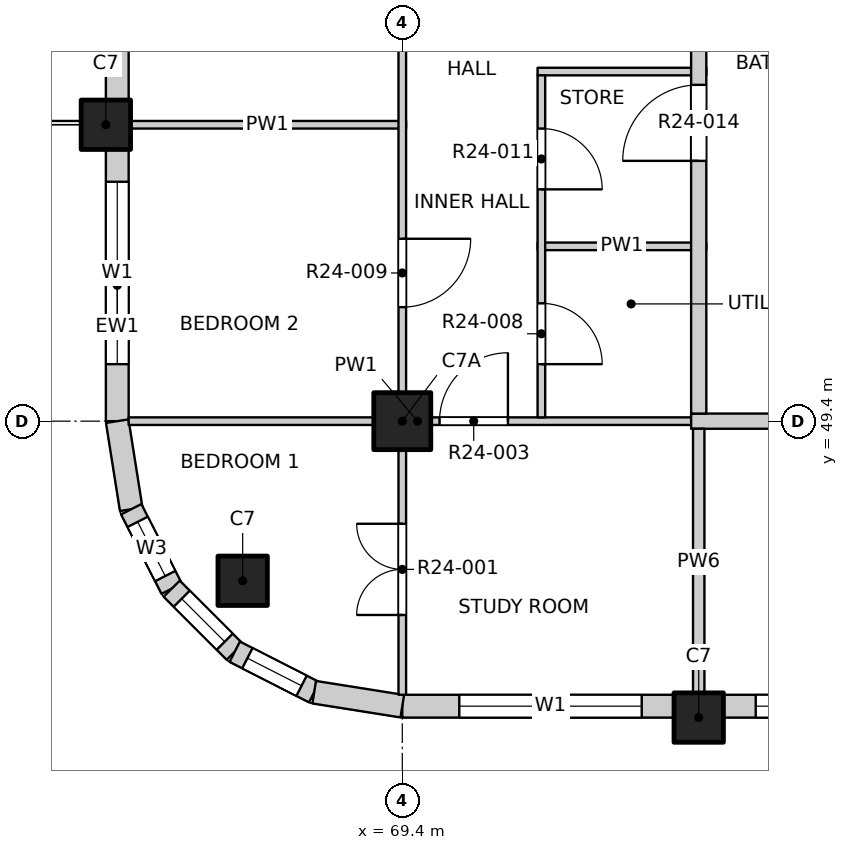
"""IFC4 building model, lengths in metres.
Left out: names, types, materials, properties, quantities, classifications, styles, units other than length and angle.
Written with IfcOpenShell. Run it as: python <this file> out.ifc"""

import sys

from ifc_helpers import new_model, si_unit, direction, frame, frame_2d, origin, origin_2d, place, context, subcontext, project, spatial, rectangle, extrude, element, fill, save


model = new_model("IFC4")
c1 = context("Model", 3, precision=1e-05, world=origin(), true_north=direction((0.0, 1.0)))
c2 = subcontext(c1, "Body", "Model", "MODEL_VIEW")
j1 = project(units=[si_unit("LENGTHUNIT", "METRE"), si_unit("PLANEANGLEUNIT", "RADIAN")], contexts=[c1])
p1 = place(None, origin())
s1 = spatial("IfcSite", under=j1, at=p1, CompositionType="ELEMENT")
p2 = place(p1, origin())
s2 = spatial("IfcBuilding", under=s1, at=p2, CompositionType="ELEMENT")
p3 = place(p2, frame((0.0, 0.0, 246.0)))
s3 = spatial("IfcBuildingStorey", under=s2, at=p3, CompositionType="ELEMENT", Elevation=246.0)
for number, where, z_axis, x_axis in (
    (1, (67.3, 47.3, -0.3), (0.0, 0.0, 1.0), (1.0, 0.0, 0.0)),
    (2, (65.5, 53.3, -0.3), (0.0, 0.0, 1.0), (1.0, 0.0, 0.0)),
    (3, (73.3, 45.5, -0.3), (0.0, 0.0, 1.0), (1.0, 0.0, 0.0)),
):
    element("IfcColumn", number, at=place(p3, frame(where, z_axis=z_axis, x_axis=x_axis)), inside=s3, PredefinedType="COLUMN", context=c2, shape_type="SweptSolid", body=[
        extrude(rectangle(XDim=0.65, YDim=0.65, at=origin_2d()), origin(), (0.0, 0.0, 1.0), 3.45),
    ])
p4 = place(p3, frame((69.4, 49.4, -0.3), z_axis=(0.0, 0.0, 1.0), x_axis=(1.0, 0.0, 0.0)))
e4 = element("IfcColumn", 4, at=p4, inside=s3, PredefinedType="COLUMN", context=c2, shape_type="SweptSolid", body=[
    extrude(rectangle(XDim=0.75, YDim=0.75, at=origin_2d()), origin(), (0.0, 0.0, 1.0), 3.45),
])
p5 = place(p3, frame((69.4, 45.65, 0.0), z_axis=(0.0, 0.0, 1.0), x_axis=(1.0, 0.0, 0.0)))
e5 = element("IfcWall", 5, at=p5, inside=s3, PredefinedType="SOLIDWALL", context=c2, shape_type="SweptSolid", body=[
    extrude(rectangle(XDim=3.575, YDim=0.3, at=frame_2d((1.788, 0.0))), origin(), (0.0, 0.0, 1.0), 2.7),
])
p6 = place(p5, frame((0.75, 0.0, 0.9)))
e6 = element("IfcOpeningElement", 6, at=p6, cuts=e5, PredefinedType="OPENING", context=c2, shape_type="SweptSolid", body=[
    extrude(rectangle(XDim=2.4, YDim=1.8, at=frame_2d((1.2, 0.9))), frame((0.0, 0.16, 0.0), z_axis=(0.0, -1.0, 0.0), x_axis=(1.0, 0.0, 0.0)), (0.0, 0.0, 1.0), 0.32),
])
p7 = place(p3, frame((73.625, 45.65, 0.0), z_axis=(0.0, 0.0, 1.0), x_axis=(1.0, 0.0, 0.0)))
e7 = element("IfcWall", 7, at=p7, inside=s3, PredefinedType="SOLIDWALL", context=c2, shape_type="SweptSolid", body=[
    extrude(rectangle(XDim=7.15, YDim=0.3, at=frame_2d((3.575, 0.0))), origin(), (0.0, 0.0, 1.0), 2.7),
])
p8 = place(p7, frame((0.425, 0.0, 0.9)))
e8 = element("IfcOpeningElement", 8, at=p8, cuts=e7, PredefinedType="OPENING", context=c2, shape_type="SweptSolid", body=[
    extrude(rectangle(XDim=2.4, YDim=1.8, at=frame_2d((1.2, 0.9))), frame((0.0, 0.16, 0.0), z_axis=(0.0, -1.0, 0.0), x_axis=(1.0, 0.0, 0.0)), (0.0, 0.0, 1.0), 0.32),
])
p9 = place(p7, frame((4.325, 0.0, 0.9)))
e9 = element("IfcOpeningElement", 9, at=p9, cuts=e7, PredefinedType="OPENING", context=c2, shape_type="SweptSolid", body=[
    extrude(rectangle(XDim=2.4, YDim=1.8, at=frame_2d((1.2, 0.9))), frame((0.0, 0.16, 0.0), z_axis=(0.0, -1.0, 0.0), x_axis=(1.0, 0.0, 0.0)), (0.0, 0.0, 1.0), 0.32),
])
p10 = place(p3, frame((65.65, 49.4, 0.0), z_axis=(0.0, 0.0, 1.0), x_axis=(0.0, 1.0, 0.0)))
e10 = element("IfcWall", 10, at=p10, inside=s3, PredefinedType="SOLIDWALL", context=c2, shape_type="SweptSolid", body=[
    extrude(rectangle(XDim=3.575, YDim=0.3, at=frame_2d((1.788, 0.0))), origin(), (0.0, 0.0, 1.0), 2.7),
])
p11 = place(p10, frame((0.75, 0.0, 0.9)))
e11 = element("IfcOpeningElement", 11, at=p11, cuts=e10, PredefinedType="OPENING", context=c2, shape_type="SweptSolid", body=[
    extrude(rectangle(XDim=2.4, YDim=1.8, at=frame_2d((1.2, 0.9))), frame((0.0, 0.16, 0.0), z_axis=(0.0, -1.0, 0.0), x_axis=(1.0, 0.0, 0.0)), (0.0, 0.0, 1.0), 0.32),
])
p12 = place(p3, frame((65.65, 53.625, 0.0), z_axis=(0.0, 0.0, 1.0), x_axis=(0.0, 1.0, 0.0)))
e12 = element("IfcWall", 12, at=p12, inside=s3, PredefinedType="SOLIDWALL", context=c2, shape_type="SweptSolid", body=[
    extrude(rectangle(XDim=7.15, YDim=0.3, at=frame_2d((3.575, 0.0))), origin(), (0.0, 0.0, 1.0), 2.7),
])
p13 = place(p12, frame((0.725, 0.0, 0.0)))
e13 = element("IfcOpeningElement", 13, at=p13, cuts=e12, PredefinedType="OPENING", context=c2, shape_type="SweptSolid", body=[
    extrude(rectangle(XDim=1.8, YDim=2.4, at=frame_2d((0.9, 1.2))), frame((0.0, 0.16, 0.0), z_axis=(0.0, -1.0, 0.0), x_axis=(1.0, 0.0, 0.0)), (0.0, 0.0, 1.0), 0.32),
])
p14 = place(p12, frame((4.325, 0.0, 0.9)))
e14 = element("IfcOpeningElement", 14, at=p14, cuts=e12, PredefinedType="OPENING", context=c2, shape_type="SweptSolid", body=[
    extrude(rectangle(XDim=2.4, YDim=1.8, at=frame_2d((1.2, 0.9))), frame((0.0, 0.16, 0.0), z_axis=(0.0, -1.0, 0.0), x_axis=(1.0, 0.0, 0.0)), (0.0, 0.0, 1.0), 0.32),
])
p15 = place(p3, frame((65.65, 49.4, 0.0), z_axis=(0.0, 0.0, 1.0), x_axis=(0.156496880861, -0.987678452879, 0.0)))
e15 = element("IfcWall", 15, at=p15, inside=s3, PredefinedType="SOLIDWALL", context=c2, shape_type="SweptSolid", body=[
    extrude(rectangle(XDim=1.173, YDim=0.3, at=frame_2d((0.586, 0.0))), origin(), (0.0, 0.0, 1.0), 2.7),
])
p16 = place(p3, frame((65.833, 48.241, 0.0), z_axis=(0.0, 0.0, 1.0), x_axis=(0.454025524128, -0.890988677504, 0.0)))
e16 = element("IfcWall", 16, at=p16, inside=s3, PredefinedType="SOLIDWALL", context=c2, shape_type="SweptSolid", body=[
    extrude(rectangle(XDim=1.173, YDim=0.3, at=frame_2d((0.587, 0.0))), origin(), (0.0, 0.0, 1.0), 2.7),
])
p17 = place(p16, frame((0.187, 0.0, 0.9)))
e17 = element("IfcOpeningElement", 17, at=p17, cuts=e16, PredefinedType="OPENING", context=c2, shape_type="SweptSolid", body=[
    extrude(rectangle(XDim=0.8, YDim=1.2, at=frame_2d((0.4, 0.6))), frame((0.0, 0.16, 0.0), z_axis=(0.0, -1.0, 0.0), x_axis=(1.0, 0.0, 0.0)), (0.0, 0.0, 1.0), 0.32),
])
p18 = place(p3, frame((66.366, 47.196, 0.0), z_axis=(0.0, 0.0, 1.0), x_axis=(0.707106781187, -0.707106781187, 0.0)))
e18 = element("IfcWall", 18, at=p18, inside=s3, PredefinedType="SOLIDWALL", context=c2, shape_type="SweptSolid", body=[
    extrude(rectangle(XDim=1.173, YDim=0.3, at=frame_2d((0.586, 0.0))), origin(), (0.0, 0.0, 1.0), 2.7),
])
p19 = place(p18, frame((0.187, 0.0, 0.9)))
e19 = element("IfcOpeningElement", 19, at=p19, cuts=e18, PredefinedType="OPENING", context=c2, shape_type="SweptSolid", body=[
    extrude(rectangle(XDim=0.8, YDim=1.2, at=frame_2d((0.4, 0.6))), frame((0.0, 0.16, 0.0), z_axis=(0.0, -1.0, 0.0), x_axis=(1.0, 0.0, 0.0)), (0.0, 0.0, 1.0), 0.32),
])
p20 = place(p3, frame((67.196, 46.366, 0.0), z_axis=(0.0, 0.0, 1.0), x_axis=(0.890988677504, -0.454025524128, 0.0)))
e20 = element("IfcWall", 20, at=p20, inside=s3, PredefinedType="SOLIDWALL", context=c2, shape_type="SweptSolid", body=[
    extrude(rectangle(XDim=1.173, YDim=0.3, at=frame_2d((0.587, 0.0))), origin(), (0.0, 0.0, 1.0), 2.7),
])
p21 = place(p20, frame((0.187, 0.0, 0.9)))
e21 = element("IfcOpeningElement", 21, at=p21, cuts=e20, PredefinedType="OPENING", context=c2, shape_type="SweptSolid", body=[
    extrude(rectangle(XDim=0.8, YDim=1.2, at=frame_2d((0.4, 0.6))), frame((0.0, 0.16, 0.0), z_axis=(0.0, -1.0, 0.0), x_axis=(1.0, 0.0, 0.0)), (0.0, 0.0, 1.0), 0.32),
])
p22 = place(p3, frame((68.241, 45.833, 0.0), z_axis=(0.0, 0.0, 1.0), x_axis=(0.987678452879, -0.156496880861, 0.0)))
e22 = element("IfcWall", 22, at=p22, inside=s3, PredefinedType="SOLIDWALL", context=c2, shape_type="SweptSolid", body=[
    extrude(rectangle(XDim=1.173, YDim=0.3, at=frame_2d((0.586, 0.0))), origin(), (0.0, 0.0, 1.0), 2.7),
])
p23 = place(p3, frame((65.8, 49.4, 0.0), z_axis=(0.0, 0.0, 1.0), x_axis=(1.0, 0.0, 0.0)))
e23 = element("IfcWall", 23, at=p23, inside=s3, PredefinedType="PARTITIONING", context=c2, shape_type="SweptSolid", body=[
    extrude(rectangle(XDim=7.6, YDim=0.1, at=frame_2d((3.8, 0.0))), origin(), (0.0, 0.0, 1.0), 3.15),
])
p24 = place(p23, frame((4.09, 0.0, 0.0)))
e24 = element("IfcOpeningElement", 24, at=p24, cuts=e23, PredefinedType="OPENING", context=c2, shape_type="SweptSolid", body=[
    extrude(rectangle(XDim=0.9, YDim=2.1, at=frame_2d((0.45, 1.05))), frame((0.0, 0.06, 0.0), z_axis=(0.0, -1.0, 0.0), x_axis=(1.0, 0.0, 0.0)), (0.0, 0.0, 1.0), 0.12),
])
p25 = place(p3, frame((73.2, 49.4, 0.0), z_axis=(0.0, 0.0, 1.0), x_axis=(1.0, 0.0, 0.0)))
e25 = element("IfcWall", 25, at=p25, inside=s3, PredefinedType="PARTITIONING", context=c2, shape_type="SweptSolid", body=[
    extrude(rectangle(XDim=23.6, YDim=0.2, at=frame_2d((11.8, 0.0))), origin(), (0.0, 0.0, 1.0), 3.15),
])
p26 = place(p25, frame((7.3, 0.0, 0.0)))
e26 = element("IfcOpeningElement", 26, at=p26, cuts=e25, PredefinedType="OPENING", context=c2, shape_type="SweptSolid", body=[
    extrude(rectangle(XDim=1.2, YDim=2.1, at=frame_2d((0.6, 1.05))), frame((0.0, 0.11, 0.0), z_axis=(0.0, -1.0, 0.0), x_axis=(1.0, 0.0, 0.0)), (0.0, 0.0, 1.0), 0.22),
])
p27 = place(p25, frame((20.075, 0.0, 0.0)))
e27 = element("IfcOpeningElement", 27, at=p27, cuts=e25, PredefinedType="OPENING", context=c2, shape_type="SweptSolid", body=[
    extrude(rectangle(XDim=1.2, YDim=2.1, at=frame_2d((0.6, 1.05))), frame((0.0, 0.11, 0.0), z_axis=(0.0, -1.0, 0.0), x_axis=(1.0, 0.0, 0.0)), (0.0, 0.0, 1.0), 0.22),
])
p28 = place(p3, frame((71.18, 51.7, 0.0), z_axis=(0.0, 0.0, 1.0), x_axis=(1.0, 0.0, 0.0)))
e28 = element("IfcWall", 28, at=p28, inside=s3, PredefinedType="PARTITIONING", context=c2, shape_type="SweptSolid", body=[
    extrude(rectangle(XDim=2.22, YDim=0.1, at=frame_2d((1.11, 0.0))), origin(), (0.0, 0.0, 1.0), 3.15),
])
p29 = place(p3, frame((65.8, 53.3, 0.0), z_axis=(0.0, 0.0, 1.0), x_axis=(1.0, 0.0, 0.0)))
e29 = element("IfcWall", 29, at=p29, inside=s3, PredefinedType="PARTITIONING", context=c2, shape_type="SweptSolid", body=[
    extrude(rectangle(XDim=3.65, YDim=0.1, at=frame_2d((1.825, 0.0))), origin(), (0.0, 0.0, 1.0), 3.15),
])
p30 = place(p3, frame((71.18, 54.0, 0.0), z_axis=(0.0, 0.0, 1.0), x_axis=(1.0, 0.0, 0.0)))
e30 = element("IfcWall", 30, at=p30, inside=s3, PredefinedType="PARTITIONING", context=c2, shape_type="SweptSolid", body=[
    extrude(rectangle(XDim=2.22, YDim=0.1, at=frame_2d((1.11, 0.0))), origin(), (0.0, 0.0, 1.0), 3.15),
])
p31 = place(p3, frame((69.4, 45.8, 0.0), z_axis=(0.0, 0.0, 1.0), x_axis=(0.0, 1.0, 0.0)))
e31 = element("IfcWall", 31, at=p31, inside=s3, PredefinedType="PARTITIONING", context=c2, shape_type="SweptSolid", body=[
    extrude(rectangle(XDim=38.4, YDim=0.1, at=frame_2d((19.2, 0.0))), origin(), (0.0, 0.0, 1.0), 3.15),
])
p32 = place(p31, frame((1.05, 0.0, 0.0)))
e32 = element("IfcOpeningElement", 32, at=p32, cuts=e31, PredefinedType="OPENING", context=c2, shape_type="SweptSolid", body=[
    extrude(rectangle(XDim=1.2, YDim=2.1, at=frame_2d((0.6, 1.05))), frame((0.0, 0.06, 0.0), z_axis=(0.0, -1.0, 0.0), x_axis=(1.0, 0.0, 0.0)), (0.0, 0.0, 1.0), 0.12),
])
p33 = place(p31, frame((5.1, 0.0, 0.0)))
e33 = element("IfcOpeningElement", 33, at=p33, cuts=e31, PredefinedType="OPENING", context=c2, shape_type="SweptSolid", body=[
    extrude(rectangle(XDim=0.9, YDim=2.1, at=frame_2d((0.45, 1.05))), frame((0.0, 0.06, 0.0), z_axis=(0.0, -1.0, 0.0), x_axis=(1.0, 0.0, 0.0)), (0.0, 0.0, 1.0), 0.12),
])
p34 = place(p31, frame((9.0, 0.0, 0.0)))
e34 = element("IfcOpeningElement", 34, at=p34, cuts=e31, PredefinedType="OPENING", context=c2, shape_type="SweptSolid", body=[
    extrude(rectangle(XDim=0.9, YDim=2.1, at=frame_2d((0.45, 1.05))), frame((0.0, 0.06, 0.0), z_axis=(0.0, -1.0, 0.0), x_axis=(1.0, 0.0, 0.0)), (0.0, 0.0, 1.0), 0.12),
])
p35 = place(p31, frame((12.9, 0.0, 0.0)))
e35 = element("IfcOpeningElement", 35, at=p35, cuts=e31, PredefinedType="OPENING", context=c2, shape_type="SweptSolid", body=[
    extrude(rectangle(XDim=0.9, YDim=2.1, at=frame_2d((0.45, 1.05))), frame((0.0, 0.06, 0.0), z_axis=(0.0, -1.0, 0.0), x_axis=(1.0, 0.0, 0.0)), (0.0, 0.0, 1.0), 0.12),
])
p36 = place(p31, frame((16.8, 0.0, 0.0)))
e36 = element("IfcOpeningElement", 36, at=p36, cuts=e31, PredefinedType="OPENING", context=c2, shape_type="SweptSolid", body=[
    extrude(rectangle(XDim=0.9, YDim=2.1, at=frame_2d((0.45, 1.05))), frame((0.0, 0.06, 0.0), z_axis=(0.0, -1.0, 0.0), x_axis=(1.0, 0.0, 0.0)), (0.0, 0.0, 1.0), 0.12),
])
p37 = place(p31, frame((20.7, 0.0, 0.0)))
e37 = element("IfcOpeningElement", 37, at=p37, cuts=e31, PredefinedType="OPENING", context=c2, shape_type="SweptSolid", body=[
    extrude(rectangle(XDim=0.9, YDim=2.1, at=frame_2d((0.45, 1.05))), frame((0.0, 0.06, 0.0), z_axis=(0.0, -1.0, 0.0), x_axis=(1.0, 0.0, 0.0)), (0.0, 0.0, 1.0), 0.12),
])
p38 = place(p31, frame((24.6, 0.0, 0.0)))
e38 = element("IfcOpeningElement", 38, at=p38, cuts=e31, PredefinedType="OPENING", context=c2, shape_type="SweptSolid", body=[
    extrude(rectangle(XDim=0.9, YDim=2.1, at=frame_2d((0.45, 1.05))), frame((0.0, 0.06, 0.0), z_axis=(0.0, -1.0, 0.0), x_axis=(1.0, 0.0, 0.0)), (0.0, 0.0, 1.0), 0.12),
])
p39 = place(p31, frame((30.3, 0.0, 0.0)))
e39 = element("IfcOpeningElement", 39, at=p39, cuts=e31, PredefinedType="OPENING", context=c2, shape_type="SweptSolid", body=[
    extrude(rectangle(XDim=1.2, YDim=2.1, at=frame_2d((0.6, 1.05))), frame((0.0, 0.06, 0.0), z_axis=(0.0, -1.0, 0.0), x_axis=(1.0, 0.0, 0.0)), (0.0, 0.0, 1.0), 0.12),
])
p40 = place(p31, frame((36.15, 0.0, 0.0)))
e40 = element("IfcOpeningElement", 40, at=p40, cuts=e31, PredefinedType="OPENING", context=c2, shape_type="SweptSolid", body=[
    extrude(rectangle(XDim=1.2, YDim=2.1, at=frame_2d((0.6, 1.05))), frame((0.0, 0.06, 0.0), z_axis=(0.0, -1.0, 0.0), x_axis=(1.0, 0.0, 0.0)), (0.0, 0.0, 1.0), 0.12),
])
p41 = place(p3, frame((71.23, 49.45, 0.0), z_axis=(0.0, 0.0, 1.0), x_axis=(0.0, 1.0, 0.0)))
e41 = element("IfcWall", 41, at=p41, inside=s3, PredefinedType="PARTITIONING", context=c2, shape_type="SweptSolid", body=[
    extrude(rectangle(XDim=4.5, YDim=0.1, at=frame_2d((2.25, 0.0))), origin(), (0.0, 0.0, 1.0), 3.15),
])
p42 = place(p41, frame((0.7, 0.0, 0.0)))
e42 = element("IfcOpeningElement", 42, at=p42, cuts=e41, PredefinedType="OPENING", context=c2, shape_type="SweptSolid", body=[
    extrude(rectangle(XDim=0.8, YDim=2.1, at=frame_2d((0.4, 1.05))), frame((0.0, 0.06, 0.0), z_axis=(0.0, -1.0, 0.0), x_axis=(1.0, 0.0, 0.0)), (0.0, 0.0, 1.0), 0.12),
])
p43 = place(p41, frame((3.0, 0.0, 0.0)))
e43 = element("IfcOpeningElement", 43, at=p43, cuts=e41, PredefinedType="OPENING", context=c2, shape_type="SweptSolid", body=[
    extrude(rectangle(XDim=0.8, YDim=2.1, at=frame_2d((0.4, 1.05))), frame((0.0, 0.06, 0.0), z_axis=(0.0, -1.0, 0.0), x_axis=(1.0, 0.0, 0.0)), (0.0, 0.0, 1.0), 0.12),
])
p44 = place(p3, frame((73.3, 45.8, 0.0), z_axis=(0.0, 0.0, 1.0), x_axis=(0.0, 1.0, 0.0)))
e44 = element("IfcWall", 44, at=p44, inside=s3, PredefinedType="PARTITIONING", context=c2, shape_type="SweptSolid", body=[
    extrude(rectangle(XDim=3.5, YDim=0.15, at=frame_2d((1.75, 0.0))), origin(), (0.0, 0.0, 1.0), 3.15),
])
p45 = place(p3, frame((73.3, 49.5, 0.0), z_axis=(0.0, 0.0, 1.0), x_axis=(0.0, 1.0, 0.0)))
e45 = element("IfcWall", 45, at=p45, inside=s3, PredefinedType="PARTITIONING", context=c2, shape_type="SweptSolid", body=[
    extrude(rectangle(XDim=34.7, YDim=0.2, at=frame_2d((17.35, 0.0))), origin(), (0.0, 0.0, 1.0), 3.15),
])
p46 = place(p45, frame((3.325, 0.0, 0.0)))
e46 = element("IfcOpeningElement", 46, at=p46, cuts=e45, PredefinedType="OPENING", context=c2, shape_type="SweptSolid", body=[
    extrude(rectangle(XDim=1.0, YDim=2.1, at=frame_2d((0.5, 1.05))), frame((0.0, 0.11, 0.0), z_axis=(0.0, -1.0, 0.0), x_axis=(1.0, 0.0, 0.0)), (0.0, 0.0, 1.0), 0.22),
])
p47 = place(p45, frame((17.875, 0.0, 0.0)))
e47 = element("IfcOpeningElement", 47, at=p47, cuts=e45, PredefinedType="OPENING", context=c2, shape_type="SweptSolid", body=[
    extrude(rectangle(XDim=1.0, YDim=2.1, at=frame_2d((0.5, 1.05))), frame((0.0, 0.11, 0.0), z_axis=(0.0, -1.0, 0.0), x_axis=(1.0, 0.0, 0.0)), (0.0, 0.0, 1.0), 0.22),
])
p48 = place(p45, frame((25.775, 0.0, 0.0)))
e48 = element("IfcOpeningElement", 48, at=p48, cuts=e45, PredefinedType="OPENING", context=c2, shape_type="SweptSolid", body=[
    extrude(rectangle(XDim=1.0, YDim=2.1, at=frame_2d((0.5, 1.05))), frame((0.0, 0.11, 0.0), z_axis=(0.0, -1.0, 0.0), x_axis=(1.0, 0.0, 0.0)), (0.0, 0.0, 1.0), 0.22),
])
p49 = place(p6, origin())
e49 = element("IfcWindow", 49, at=p49, inside=s3, PartitioningType="DOUBLE_PANEL_VERTICAL", PredefinedType="WINDOW", context=c2, shape_type="SweptSolid", body=[
    extrude(rectangle(XDim=2.4, YDim=1.8, at=frame_2d((1.2, 0.9))), frame((0.0, 0.03, 0.0), z_axis=(0.0, -1.0, 0.0), x_axis=(1.0, 0.0, 0.0)), (0.0, 0.0, 1.0), 0.06),
])
fill(e6, e49)
p50 = place(p8, origin())
e50 = element("IfcWindow", 50, at=p50, inside=s3, PartitioningType="DOUBLE_PANEL_VERTICAL", PredefinedType="WINDOW", context=c2, shape_type="SweptSolid", body=[
    extrude(rectangle(XDim=2.4, YDim=1.8, at=frame_2d((1.2, 0.9))), frame((0.0, 0.03, 0.0), z_axis=(0.0, -1.0, 0.0), x_axis=(1.0, 0.0, 0.0)), (0.0, 0.0, 1.0), 0.06),
])
fill(e8, e50)
p51 = place(p11, origin())
e51 = element("IfcWindow", 51, at=p51, inside=s3, PartitioningType="DOUBLE_PANEL_VERTICAL", PredefinedType="WINDOW", context=c2, shape_type="SweptSolid", body=[
    extrude(rectangle(XDim=2.4, YDim=1.8, at=frame_2d((1.2, 0.9))), frame((0.0, 0.03, 0.0), z_axis=(0.0, -1.0, 0.0), x_axis=(1.0, 0.0, 0.0)), (0.0, 0.0, 1.0), 0.06),
])
fill(e11, e51)
p52 = place(p17, origin())
e52 = element("IfcWindow", 52, at=p52, inside=s3, PartitioningType="SINGLE_PANEL", PredefinedType="WINDOW", context=c2, shape_type="SweptSolid", body=[
    extrude(rectangle(XDim=0.8, YDim=1.2, at=frame_2d((0.4, 0.6))), frame((0.0, 0.03, 0.0), z_axis=(0.0, -1.0, 0.0), x_axis=(1.0, 0.0, 0.0)), (0.0, 0.0, 1.0), 0.06),
])
fill(e17, e52)
p53 = place(p19, origin())
e53 = element("IfcWindow", 53, at=p53, inside=s3, PartitioningType="SINGLE_PANEL", PredefinedType="WINDOW", context=c2, shape_type="SweptSolid", body=[
    extrude(rectangle(XDim=0.8, YDim=1.2, at=frame_2d((0.4, 0.6))), frame((0.0, 0.03, 0.0), z_axis=(0.0, -1.0, 0.0), x_axis=(1.0, 0.0, 0.0)), (0.0, 0.0, 1.0), 0.06),
])
fill(e19, e53)
p54 = place(p21, origin())
e54 = element("IfcWindow", 54, at=p54, inside=s3, PartitioningType="SINGLE_PANEL", PredefinedType="WINDOW", context=c2, shape_type="SweptSolid", body=[
    extrude(rectangle(XDim=0.8, YDim=1.2, at=frame_2d((0.4, 0.6))), frame((0.0, 0.03, 0.0), z_axis=(0.0, -1.0, 0.0), x_axis=(1.0, 0.0, 0.0)), (0.0, 0.0, 1.0), 0.06),
])
fill(e21, e54)
p55 = place(p32, origin())
e55 = element("IfcDoor", 55, at=p55, inside=s3, OperationType="DOUBLE_DOOR_SINGLE_SWING", PredefinedType="DOOR", context=c2, shape_type="SweptSolid", body=[
    extrude(rectangle(XDim=1.2, YDim=2.1, at=frame_2d((0.6, 1.05))), frame((0.0, 0.025, 0.0), z_axis=(0.0, -1.0, 0.0), x_axis=(1.0, 0.0, 0.0)), (0.0, 0.0, 1.0), 0.05),
])
fill(e32, e55)
p56 = place(p24, origin())
e56 = element("IfcDoor", 56, at=p56, inside=s3, OperationType="SINGLE_SWING_RIGHT", PredefinedType="DOOR", context=c2, shape_type="SweptSolid", body=[
    extrude(rectangle(XDim=0.9, YDim=2.1, at=frame_2d((0.45, 1.05))), frame((0.0, 0.025, 0.0), z_axis=(0.0, -1.0, 0.0), x_axis=(1.0, 0.0, 0.0)), (0.0, 0.0, 1.0), 0.05),
])
fill(e24, e56)
p57 = place(p42, origin())
e57 = element("IfcDoor", 57, at=p57, inside=s3, OperationType="SINGLE_SWING_RIGHT", PredefinedType="DOOR", context=c2, shape_type="SweptSolid", body=[
    extrude(rectangle(XDim=0.8, YDim=2.1, at=frame_2d((0.4, 1.05))), frame((0.0, 0.025, 0.0), z_axis=(0.0, -1.0, 0.0), x_axis=(1.0, 0.0, 0.0)), (0.0, 0.0, 1.0), 0.05),
])
fill(e42, e57)
p58 = place(p33, origin())
e58 = element("IfcDoor", 58, at=p58, inside=s3, OperationType="SINGLE_SWING_LEFT", PredefinedType="DOOR", context=c2, shape_type="SweptSolid", body=[
    extrude(rectangle(XDim=0.9, YDim=2.1, at=frame_2d((0.45, 1.05))), frame((0.0, 0.025, 0.0), z_axis=(0.0, -1.0, 0.0), x_axis=(1.0, 0.0, 0.0)), (0.0, 0.0, 1.0), 0.05),
])
fill(e33, e58)
p59 = place(p43, origin())
e59 = element("IfcDoor", 59, at=p59, inside=s3, OperationType="SINGLE_SWING_RIGHT", PredefinedType="DOOR", context=c2, shape_type="SweptSolid", body=[
    extrude(rectangle(XDim=0.8, YDim=2.1, at=frame_2d((0.4, 1.05))), frame((0.0, 0.025, 0.0), z_axis=(0.0, -1.0, 0.0), x_axis=(1.0, 0.0, 0.0)), (0.0, 0.0, 1.0), 0.05),
])
fill(e43, e59)
p60 = place(p46, origin())
e60 = element("IfcDoor", 60, at=p60, inside=s3, OperationType="SINGLE_SWING_LEFT", PredefinedType="DOOR", context=c2, shape_type="SweptSolid", body=[
    extrude(rectangle(XDim=1.0, YDim=2.1, at=frame_2d((0.5, 1.05))), frame((0.0, 0.025, 0.0), z_axis=(0.0, -1.0, 0.0), x_axis=(1.0, 0.0, 0.0)), (0.0, 0.0, 1.0), 0.05),
])
fill(e46, e60)
save(model, sys.argv[1])
